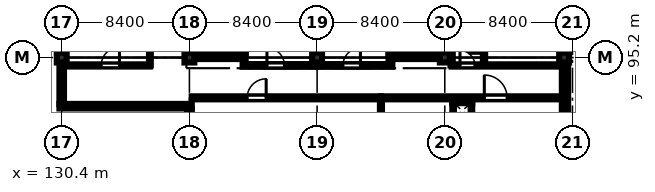
"""IFC4 building model, lengths in metres.
Left out: names, types, materials, properties, quantities, classifications, styles, units other than length and angle.
Written with IfcOpenShell. Run it as: python <this file> out.ifc"""

import sys

from ifc_helpers import new_model, si_unit, direction, frame, frame_2d, origin, origin_2d, place, context, subcontext, project, spatial, rectangle, extrude, element, fill, save


model = new_model("IFC4")
c1 = context("Model", 3, precision=1e-05, world=origin(), true_north=direction((0.0, 1.0)))
c2 = subcontext(c1, "Body", "Model", "MODEL_VIEW")
j1 = project(units=[si_unit("LENGTHUNIT", "METRE"), si_unit("PLANEANGLEUNIT", "RADIAN")], contexts=[c1])
p1 = place(None, origin())
s1 = spatial("IfcSite", under=j1, at=p1, CompositionType="ELEMENT")
p2 = place(p1, origin())
s2 = spatial("IfcBuilding", under=s1, at=p2, CompositionType="ELEMENT")
p3 = place(p2, frame((0.0, 0.0, 65.7)))
s3 = spatial("IfcBuildingStorey", under=s2, at=p3, CompositionType="ELEMENT", Elevation=65.7)
for number, where, z_axis, x_axis in (
    (1, (130.4, 95.2, 0.0), (0.0, 0.0, 1.0), (1.0, 0.0, 0.0)),
    (2, (138.8, 95.2, 0.0), (0.0, 0.0, 1.0), (1.0, 0.0, 0.0)),
    (3, (147.2, 95.2, 0.0), (0.0, 0.0, 1.0), (1.0, 0.0, 0.0)),
    (4, (155.6, 95.2, 0.0), (0.0, 0.0, 1.0), (1.0, 0.0, 0.0)),
    (5, (163.45, 95.2, 0.0), (0.0, 0.0, 1.0), (1.0, 0.0, 0.0)),
):
    element("IfcColumn", number, at=place(p3, frame(where, z_axis=z_axis, x_axis=x_axis)), inside=s3, PredefinedType="COLUMN", context=c2, shape_type="SweptSolid", body=[
        extrude(rectangle(XDim=0.65, YDim=0.65, at=origin_2d()), origin(), (0.0, 0.0, 1.0), 4.3),
    ])
p4 = place(p3, frame((138.7, 95.275, 0.0), z_axis=(0.0, 0.0, 1.0), x_axis=(1.0, 0.0, 0.0)))
e6 = element("IfcWall", 6, at=p4, inside=s3, PredefinedType="SHEAR", context=c2, shape_type="SweptSolid", body=[
    extrude(rectangle(XDim=3.8, YDim=0.35, at=frame_2d((1.9, 0.0))), origin(), (0.0, 0.0, 1.0), 4.3),
])
p5 = place(p3, frame((138.875, 95.45, 0.0), z_axis=(0.0, 0.0, 1.0), x_axis=(0.0, 1.0, 0.0)))
e7 = element("IfcWall", 7, at=p5, inside=s3, PredefinedType="SHEAR", context=c2, shape_type="SweptSolid", body=[
    extrude(rectangle(XDim=7.9, YDim=0.35, at=frame_2d((3.95, 0.0))), origin(), (0.0, 0.0, 1.0), 4.3),
])
p6 = place(p3, frame((142.325, 95.45, 0.0), z_axis=(0.0, 0.0, 1.0), x_axis=(0.0, 1.0, 0.0)))
e8 = element("IfcWall", 8, at=p6, inside=s3, PredefinedType="SHEAR", context=c2, shape_type="SweptSolid", body=[
    extrude(rectangle(XDim=7.9, YDim=0.35, at=frame_2d((3.95, 0.0))), origin(), (0.0, 0.0, 1.0), 4.3),
])
p7 = place(p6, frame((0.22, 0.0, 0.0)))
e9 = element("IfcOpeningElement", 9, at=p7, cuts=e8, PredefinedType="OPENING", context=c2, shape_type="SweptSolid", body=[
    extrude(rectangle(XDim=1.15, YDim=2.15, at=frame_2d((0.575, 1.075))), frame((0.0, 0.185, 0.0), z_axis=(0.0, -1.0, 0.0), x_axis=(1.0, 0.0, 0.0)), (0.0, 0.0, 1.0), 0.37),
])
p8 = place(p3, frame((151.9, 95.275, 0.0), z_axis=(0.0, 0.0, 1.0), x_axis=(1.0, 0.0, 0.0)))
e10 = element("IfcWall", 10, at=p8, inside=s3, PredefinedType="SHEAR", context=c2, shape_type="SweptSolid", body=[
    extrude(rectangle(XDim=3.8, YDim=0.35, at=frame_2d((1.9, 0.0))), origin(), (0.0, 0.0, 1.0), 4.3),
])
p9 = place(p3, frame((152.075, 95.45, 0.0), z_axis=(0.0, 0.0, 1.0), x_axis=(0.0, 1.0, 0.0)))
e11 = element("IfcWall", 11, at=p9, inside=s3, PredefinedType="SHEAR", context=c2, shape_type="SweptSolid", body=[
    extrude(rectangle(XDim=7.9, YDim=0.35, at=frame_2d((3.95, 0.0))), origin(), (0.0, 0.0, 1.0), 4.3),
])
p10 = place(p9, frame((0.35, 0.0, 0.0)))
e12 = element("IfcOpeningElement", 12, at=p10, cuts=e11, PredefinedType="OPENING", context=c2, shape_type="SweptSolid", body=[
    extrude(rectangle(XDim=1.15, YDim=2.15, at=frame_2d((0.575, 1.075))), frame((0.0, 0.185, 0.0), z_axis=(0.0, -1.0, 0.0), x_axis=(1.0, 0.0, 0.0)), (0.0, 0.0, 1.0), 0.37),
])
p11 = place(p3, frame((155.525, 95.45, 0.0), z_axis=(0.0, 0.0, 1.0), x_axis=(0.0, 1.0, 0.0)))
e13 = element("IfcWall", 13, at=p11, inside=s3, PredefinedType="SHEAR", context=c2, shape_type="SweptSolid", body=[
    extrude(rectangle(XDim=7.9, YDim=0.35, at=frame_2d((3.95, 0.0))), origin(), (0.0, 0.0, 1.0), 4.3),
])
p12 = place(p3, frame((163.45, 94.875, 0.0), z_axis=(0.0, 0.0, 1.0), x_axis=(0.0, -1.0, 0.0)))
e14 = element("IfcWall", 14, at=p12, inside=s3, PredefinedType="STANDARD", context=c2, shape_type="SweptSolid", body=[
    extrude(rectangle(XDim=7.75, YDim=0.3, at=frame_2d((3.875, 0.0))), origin(), (0.0, 0.0, 1.0), 3.7),
])
p13 = place(p12, frame((4.2, 0.0, 1.1)))
e15 = element("IfcOpeningElement", 15, at=p13, cuts=e14, PredefinedType="OPENING", context=c2, shape_type="SweptSolid", body=[
    extrude(rectangle(XDim=1.8, YDim=1.8, at=frame_2d((0.9, 0.9))), frame((0.0, 0.16, 0.0), z_axis=(0.0, -1.0, 0.0), x_axis=(1.0, 0.0, 0.0)), (0.0, 0.0, 1.0), 0.32),
])
p14 = place(p3, frame((163.45, 103.275, 0.0), z_axis=(0.0, 0.0, 1.0), x_axis=(0.0, -1.0, 0.0)))
e16 = element("IfcWall", 16, at=p14, inside=s3, PredefinedType="STANDARD", context=c2, shape_type="SweptSolid", body=[
    extrude(rectangle(XDim=7.75, YDim=0.3, at=frame_2d((3.875, 0.0))), origin(), (0.0, 0.0, 1.0), 3.7),
])
p15 = place(p14, frame((1.15, 0.0, 1.1)))
e17 = element("IfcOpeningElement", 17, at=p15, cuts=e16, PredefinedType="OPENING", context=c2, shape_type="SweptSolid", body=[
    extrude(rectangle(XDim=1.4, YDim=1.4, at=frame_2d((0.7, 0.7))), frame((0.0, 0.16, 0.0), z_axis=(0.0, -1.0, 0.0), x_axis=(1.0, 0.0, 0.0)), (0.0, 0.0, 1.0), 0.32),
])
p16 = place(p3, frame((130.4, 92.15, 0.0), z_axis=(0.0, 0.0, 1.0), x_axis=(0.0, 1.0, 0.0)))
e18 = element("IfcWall", 18, at=p16, inside=s3, PredefinedType="STANDARD", context=c2, shape_type="SweptSolid", body=[
    extrude(rectangle(XDim=2.725, YDim=0.3, at=frame_2d((1.363, 0.0))), origin(), (0.0, 0.0, 1.0), 4.3),
])
p17 = place(p3, frame((138.8, 87.125, 0.0), z_axis=(0.0, 0.0, 1.0), x_axis=(0.0, 1.0, 0.0)))
e19 = element("IfcWall", 19, at=p17, inside=s3, PredefinedType="STANDARD", context=c2, shape_type="SweptSolid", body=[
    extrude(rectangle(XDim=4.725, YDim=0.3, at=frame_2d((2.363, 0.0))), origin(), (0.0, 0.0, 1.0), 3.7),
])
p18 = place(p17, frame((2.4, 0.0, 0.95)))
e20 = element("IfcOpeningElement", 20, at=p18, cuts=e19, PredefinedType="OPENING", context=c2, shape_type="SweptSolid", body=[
    extrude(rectangle(XDim=1.5, YDim=1.8, at=frame_2d((0.75, 0.9))), frame((0.0, 0.16, 0.0), z_axis=(0.0, -1.0, 0.0), x_axis=(1.0, 0.0, 0.0)), (0.0, 0.0, 1.0), 0.32),
])
p19 = place(p3, frame((130.4, 95.525, 0.0), z_axis=(0.0, 0.0, 1.0), x_axis=(0.0, 1.0, 0.0)))
e21 = element("IfcWall", 21, at=p19, inside=s3, PredefinedType="STANDARD", context=c2, shape_type="SweptSolid", body=[
    extrude(rectangle(XDim=7.75, YDim=0.3, at=frame_2d((3.875, 0.0))), origin(), (0.0, 0.0, 1.0), 3.7),
])
p20 = place(p19, frame((2.4, 0.0, 1.0)))
e22 = element("IfcOpeningElement", 22, at=p20, cuts=e21, PredefinedType="OPENING", context=c2, shape_type="SweptSolid", body=[
    extrude(rectangle(XDim=1.8, YDim=1.8, at=frame_2d((0.9, 0.9))), frame((0.0, 0.16, 0.0), z_axis=(0.0, -1.0, 0.0), x_axis=(1.0, 0.0, 0.0)), (0.0, 0.0, 1.0), 0.32),
])
p21 = place(p3, frame((138.95, 92.0, 0.0), z_axis=(0.0, 0.0, 1.0), x_axis=(-1.0, 0.0, 0.0)))
e23 = element("IfcWall", 23, at=p21, inside=s3, PredefinedType="STANDARD", context=c2, shape_type="SweptSolid", body=[
    extrude(rectangle(XDim=8.7, YDim=0.3, at=frame_2d((4.35, 0.0))), origin(), (0.0, 0.0, 1.0), 4.3),
])
p22 = place(p3, frame((163.6, 78.515, 4.5), z_axis=(0.0, 0.0, 1.0), x_axis=(0.0, 1.0, 0.0)))
e24 = element("IfcWall", 24, at=p22, inside=s3, PredefinedType="PARAPET", context=c2, shape_type="SweptSolid", body=[
    extrude(rectangle(XDim=32.97, YDim=0.23, at=frame_2d((16.485, 0.0))), origin(), (0.0, 0.0, 1.0), 1.35),
])
p23 = place(p3, frame((130.4, 103.485, 4.5), z_axis=(0.0, 0.0, 1.0), x_axis=(0.0, -1.0, 0.0)))
e25 = element("IfcWall", 25, at=p23, inside=s3, PredefinedType="PARAPET", context=c2, shape_type="SweptSolid", body=[
    extrude(rectangle(XDim=11.37, YDim=0.23, at=frame_2d((5.685, 0.0))), origin(), (0.0, 0.0, 1.0), 1.35),
])
p24 = place(p3, frame((130.285, 92.0, 4.5), z_axis=(0.0, 0.0, 1.0), x_axis=(1.0, 0.0, 0.0)))
e26 = element("IfcWall", 26, at=p24, inside=s3, PredefinedType="PARAPET", context=c2, shape_type="SweptSolid", body=[
    extrude(rectangle(XDim=8.63, YDim=0.23, at=frame_2d((4.315, 0.0))), origin(), (0.0, 0.0, 1.0), 1.35),
])
p25 = place(p3, frame((138.8, 91.885, 4.5), z_axis=(0.0, 0.0, 1.0), x_axis=(0.0, -1.0, 0.0)))
e27 = element("IfcWall", 27, at=p25, inside=s3, PredefinedType="PARAPET", context=c2, shape_type="SweptSolid", body=[
    extrude(rectangle(XDim=13.37, YDim=0.23, at=frame_2d((6.685, 0.0))), origin(), (0.0, 0.0, 1.0), 1.35),
])
p26 = place(p3, frame((142.3, 94.68, 0.0), z_axis=(0.0, 0.0, 1.0), x_axis=(1.0, 0.0, 0.0)))
e28 = element("IfcWall", 28, at=p26, inside=s3, PredefinedType="STANDARD", context=c2, shape_type="SweptSolid", body=[
    extrude(rectangle(XDim=4.8, YDim=0.18, at=frame_2d((2.4, 0.0))), origin(), (0.0, 0.0, 1.0), 4.3),
])
p27 = place(p26, frame((1.6, 0.0, 0.0)))
e29 = element("IfcOpeningElement", 29, at=p27, cuts=e28, PredefinedType="OPENING", context=c2, shape_type="SweptSolid", body=[
    extrude(rectangle(XDim=1.15, YDim=2.15, at=frame_2d((0.575, 1.075))), frame((0.0, 0.1, 0.0), z_axis=(0.0, -1.0, 0.0), x_axis=(1.0, 0.0, 0.0)), (0.0, 0.0, 1.0), 0.2),
])
p28 = place(p3, frame((147.3, 94.68, 0.0), z_axis=(0.0, 0.0, 1.0), x_axis=(1.0, 0.0, 0.0)))
e30 = element("IfcWall", 30, at=p28, inside=s3, PredefinedType="STANDARD", context=c2, shape_type="SweptSolid", body=[
    extrude(rectangle(XDim=4.85, YDim=0.18, at=frame_2d((2.425, 0.0))), origin(), (0.0, 0.0, 1.0), 4.3),
])
p29 = place(p28, frame((1.6, 0.0, 0.0)))
e31 = element("IfcOpeningElement", 31, at=p29, cuts=e30, PredefinedType="OPENING", context=c2, shape_type="SweptSolid", body=[
    extrude(rectangle(XDim=1.15, YDim=2.15, at=frame_2d((0.575, 1.075))), frame((0.0, 0.1, 0.0), z_axis=(0.0, -1.0, 0.0), x_axis=(1.0, 0.0, 0.0)), (0.0, 0.0, 1.0), 0.2),
])
p30 = place(p3, frame((156.05, 94.68, 0.0), z_axis=(0.0, 0.0, 1.0), x_axis=(1.0, 0.0, 0.0)))
e32 = element("IfcWall", 32, at=p30, inside=s3, PredefinedType="PARTITIONING", context=c2, shape_type="SweptSolid", body=[
    extrude(rectangle(XDim=7.15, YDim=0.15, at=frame_2d((3.575, 0.0))), origin(), (0.0, 0.0, 1.0), 4.3),
])
p31 = place(p30, frame((0.55, 0.0, 0.0)))
e33 = element("IfcOpeningElement", 33, at=p31, cuts=e32, PredefinedType="OPENING", context=c2, shape_type="SweptSolid", body=[
    extrude(rectangle(XDim=0.98, YDim=2.12, at=frame_2d((0.49, 1.06))), frame((0.0, 0.085, 0.0), z_axis=(0.0, -1.0, 0.0), x_axis=(1.0, 0.0, 0.0)), (0.0, 0.0, 1.0), 0.17),
])
p32 = place(p3, frame((158.18, 94.68, 0.0), z_axis=(0.0, 0.0, 1.0), x_axis=(0.0, 1.0, 0.0)))
e34 = element("IfcWall", 34, at=p32, inside=s3, PredefinedType="PARTITIONING", context=c2, shape_type="SweptSolid", body=[
    extrude(rectangle(XDim=8.57, YDim=0.15, at=frame_2d((4.285, 0.0))), origin(), (0.0, 0.0, 1.0), 4.3),
])
p33 = place(p32, frame((0.8, 0.0, 0.0)))
e35 = element("IfcOpeningElement", 35, at=p33, cuts=e34, PredefinedType="OPENING", context=c2, shape_type="SweptSolid", body=[
    extrude(rectangle(XDim=1.0, YDim=2.12, at=frame_2d((0.5, 1.06))), frame((0.0, 0.085, 0.0), z_axis=(0.0, -1.0, 0.0), x_axis=(1.0, 0.0, 0.0)), (0.0, 0.0, 1.0), 0.17),
])
p34 = place(p32, frame((3.5, 0.0, 0.0)))
e36 = element("IfcOpeningElement", 36, at=p34, cuts=e34, PredefinedType="OPENING", context=c2, shape_type="SweptSolid", body=[
    extrude(rectangle(XDim=0.92, YDim=2.1, at=frame_2d((0.46, 1.05))), frame((0.0, 0.085, 0.0), z_axis=(0.0, -1.0, 0.0), x_axis=(1.0, 0.0, 0.0)), (0.0, 0.0, 1.0), 0.17),
])
p35 = place(p32, frame((6.4, 0.0, 0.0)))
e37 = element("IfcOpeningElement", 37, at=p35, cuts=e34, PredefinedType="OPENING", context=c2, shape_type="SweptSolid", body=[
    extrude(rectangle(XDim=0.92, YDim=2.1, at=frame_2d((0.46, 1.05))), frame((0.0, 0.085, 0.0), z_axis=(0.0, -1.0, 0.0), x_axis=(1.0, 0.0, 0.0)), (0.0, 0.0, 1.0), 0.17),
])
p36 = place(p3, frame((156.05, 94.68, 0.0), z_axis=(0.0, 0.0, 1.0), x_axis=(0.0, 1.0, 0.0)))
e38 = element("IfcWall", 38, at=p36, inside=s3, PredefinedType="PARTITIONING", context=c2, shape_type="SweptSolid", body=[
    extrude(rectangle(XDim=8.57, YDim=0.15, at=frame_2d((4.285, 0.0))), origin(), (0.0, 0.0, 1.0), 4.3),
])
p37 = place(p3, frame((136.2, 94.68, 0.0), z_axis=(0.0, 0.0, 1.0), x_axis=(0.0, 1.0, 0.0)))
e39 = element("IfcWall", 39, at=p37, inside=s3, PredefinedType="PARTITIONING", context=c2, shape_type="SweptSolid", body=[
    extrude(rectangle(XDim=9.07, YDim=0.12, at=frame_2d((4.535, 0.0))), origin(), (0.0, 0.0, 1.0), 4.3),
])
p38 = place(p3, frame((130.8, 94.68, 0.0), z_axis=(0.0, 0.0, 1.0), x_axis=(1.0, 0.0, 0.0)))
e40 = element("IfcWall", 40, at=p38, inside=s3, PredefinedType="PARTITIONING", context=c2, shape_type="SweptSolid", body=[
    extrude(rectangle(XDim=5.4, YDim=0.145, at=frame_2d((2.7, 0.0))), origin(), (0.0, 0.0, 1.0), 4.3),
])
p39 = place(p38, frame((2.2, 0.0, 0.0)))
e41 = element("IfcOpeningElement", 41, at=p39, cuts=e40, PredefinedType="OPENING", context=c2, shape_type="SweptSolid", body=[
    extrude(rectangle(XDim=1.2, YDim=2.2, at=frame_2d((0.6, 1.1))), frame((0.0, 0.083, 0.0), z_axis=(0.0, -1.0, 0.0), x_axis=(1.0, 0.0, 0.0)), (0.0, 0.0, 1.0), 0.165),
])
p40 = place(p3, frame((138.95, 92.55, 0.0), z_axis=(0.0, 0.0, 1.0), x_axis=(1.0, 0.0, 0.0)))
e42 = element("IfcWall", 42, at=p40, inside=s3, PredefinedType="SOLIDWALL", context=c2, shape_type="SweptSolid", body=[
    extrude(rectangle(XDim=12.45, YDim=0.2, at=frame_2d((6.225, 0.0))), origin(), (0.0, 0.0, 1.0), 4.3),
])
p41 = place(p40, frame((3.65, 0.0, 0.0)))
e43 = element("IfcOpeningElement", 43, at=p41, cuts=e42, PredefinedType="OPENING", context=c2, shape_type="SweptSolid", body=[
    extrude(rectangle(XDim=1.25, YDim=2.2, at=frame_2d((0.625, 1.1))), frame((0.0, 0.11, 0.0), z_axis=(0.0, -1.0, 0.0), x_axis=(1.0, 0.0, 0.0)), (0.0, 0.0, 1.0), 0.22),
])
p42 = place(p3, frame((151.4, 92.55, 0.0), z_axis=(0.0, 0.0, 1.0), x_axis=(1.0, 0.0, 0.0)))
e44 = element("IfcWall", 44, at=p42, inside=s3, PredefinedType="SOLIDWALL", context=c2, shape_type="SweptSolid", body=[
    extrude(rectangle(XDim=11.95, YDim=0.2, at=frame_2d((5.975, 0.0))), origin(), (0.0, 0.0, 1.0), 4.3),
])
p43 = place(p42, frame((6.8, 0.0, 0.0)))
e45 = element("IfcOpeningElement", 45, at=p43, cuts=e44, PredefinedType="OPENING", context=c2, shape_type="SweptSolid", body=[
    extrude(rectangle(XDim=1.5, YDim=2.2, at=frame_2d((0.75, 1.1))), frame((0.0, 0.11, 0.0), z_axis=(0.0, -1.0, 0.0), x_axis=(1.0, 0.0, 0.0)), (0.0, 0.0, 1.0), 0.22),
])
p44 = place(p3, frame((151.4, 78.55, 0.0), z_axis=(0.0, 0.0, 1.0), x_axis=(0.0, 1.0, 0.0)))
e46 = element("IfcWall", 46, at=p44, inside=s3, PredefinedType="PARTITIONING", context=c2, shape_type="SweptSolid", body=[
    extrude(rectangle(XDim=14.0, YDim=0.135, at=frame_2d((7.0, 0.0))), origin(), (0.0, 0.0, 1.0), 3.85),
])
p45 = place(p3, frame((156.095, 92.252, 0.0), z_axis=(0.0, 0.0, 1.0), x_axis=(1.0, 0.0, 0.0)))
e47 = element("IfcWall", 47, at=p45, inside=s3, PredefinedType="PARTITIONING", context=c2, shape_type="SweptSolid", body=[
    extrude(rectangle(XDim=1.31, YDim=0.105, at=frame_2d((0.655, 0.0))), origin(), (0.0, 0.0, 1.0), 4.3),
])
for number, where, z_axis, x_axis in (
    (48, (156.147, 91.2, 0.0), (0.0, 0.0, 1.0), (0.0, 1.0, 0.0)),
    (49, (157.353, 91.2, 0.0), (0.0, 0.0, 1.0), (0.0, 1.0, 0.0)),
):
    element("IfcWall", number, at=place(p3, frame(where, z_axis=z_axis, x_axis=x_axis)), inside=s3, PredefinedType="PARTITIONING", context=c2, shape_type="SweptSolid", body=[
        extrude(rectangle(XDim=1.0, YDim=0.105, at=frame_2d((0.5, 0.0))), origin(), (0.0, 0.0, 1.0), 4.3),
    ])
p46 = place(p27, origin())
e50 = element("IfcDoor", 50, at=p46, inside=s3, OperationType="SINGLE_SWING_LEFT", PredefinedType="DOOR", context=c2, shape_type="SweptSolid", body=[
    extrude(rectangle(XDim=1.15, YDim=2.15, at=frame_2d((0.575, 1.075))), frame((0.0, 0.025, 0.0), z_axis=(0.0, -1.0, 0.0), x_axis=(1.0, 0.0, 0.0)), (0.0, 0.0, 1.0), 0.05),
])
fill(e29, e50)
p47 = place(p29, origin())
e51 = element("IfcDoor", 51, at=p47, inside=s3, OperationType="SINGLE_SWING_RIGHT", PredefinedType="DOOR", context=c2, shape_type="SweptSolid", body=[
    extrude(rectangle(XDim=1.15, YDim=2.15, at=frame_2d((0.575, 1.075))), frame((0.0, 0.025, 0.0), z_axis=(0.0, -1.0, 0.0), x_axis=(1.0, 0.0, 0.0)), (0.0, 0.0, 1.0), 0.05),
])
fill(e31, e51)
p48 = place(p31, origin())
e52 = element("IfcDoor", 52, at=p48, inside=s3, OperationType="SINGLE_SWING_LEFT", PredefinedType="DOOR", context=c2, shape_type="SweptSolid", body=[
    extrude(rectangle(XDim=0.98, YDim=2.12, at=frame_2d((0.49, 1.06))), frame((0.0, 0.025, 0.0), z_axis=(0.0, -1.0, 0.0), x_axis=(1.0, 0.0, 0.0)), (0.0, 0.0, 1.0), 0.05),
])
fill(e33, e52)
p49 = place(p33, origin())
e53 = element("IfcDoor", 53, at=p49, inside=s3, OperationType="SINGLE_SWING_LEFT", PredefinedType="DOOR", context=c2, shape_type="SweptSolid", body=[
    extrude(rectangle(XDim=1.0, YDim=2.12, at=frame_2d((0.5, 1.06))), frame((0.0, 0.025, 0.0), z_axis=(0.0, -1.0, 0.0), x_axis=(1.0, 0.0, 0.0)), (0.0, 0.0, 1.0), 0.05),
])
fill(e35, e53)
p50 = place(p39, origin())
e54 = element("IfcDoor", 54, at=p50, inside=s3, OperationType="SINGLE_SWING_RIGHT", PredefinedType="DOOR", context=c2, shape_type="SweptSolid", body=[
    extrude(rectangle(XDim=1.2, YDim=2.2, at=frame_2d((0.6, 1.1))), frame((0.0, 0.025, 0.0), z_axis=(0.0, -1.0, 0.0), x_axis=(1.0, 0.0, 0.0)), (0.0, 0.0, 1.0), 0.05),
])
fill(e41, e54)
p51 = place(p41, origin())
e55 = element("IfcDoor", 55, at=p51, inside=s3, OperationType="SINGLE_SWING_RIGHT", PredefinedType="DOOR", context=c2, shape_type="SweptSolid", body=[
    extrude(rectangle(XDim=1.25, YDim=2.2, at=frame_2d((0.625, 1.1))), frame((0.0, 0.025, 0.0), z_axis=(0.0, -1.0, 0.0), x_axis=(1.0, 0.0, 0.0)), (0.0, 0.0, 1.0), 0.05),
])
fill(e43, e55)
p52 = place(p43, origin())
e56 = element("IfcDoor", 56, at=p52, inside=s3, OperationType="SINGLE_SWING_LEFT", PredefinedType="DOOR", context=c2, shape_type="SweptSolid", body=[
    extrude(rectangle(XDim=1.5, YDim=2.2, at=frame_2d((0.75, 1.1))), frame((0.0, 0.025, 0.0), z_axis=(0.0, -1.0, 0.0), x_axis=(1.0, 0.0, 0.0)), (0.0, 0.0, 1.0), 0.05),
])
fill(e45, e56)
save(model, sys.argv[1])
